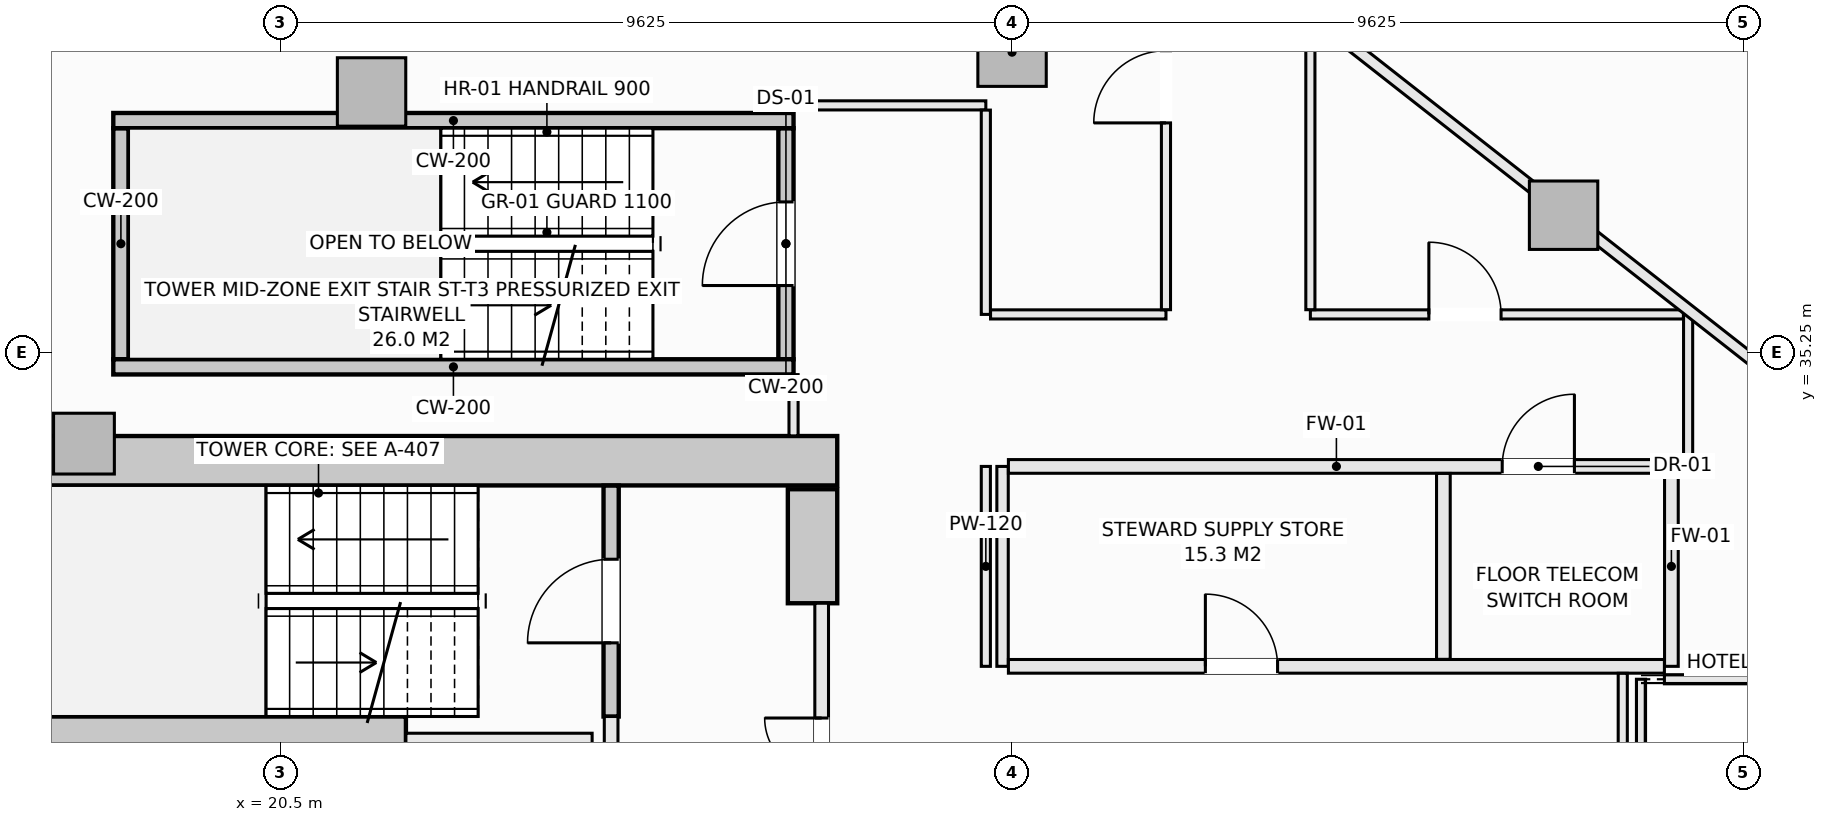
"""IFC4 building model, lengths in metres.
Left out: names, types, materials, properties, quantities, classifications, styles, units other than length and angle.
Written with IfcOpenShell. Run it as: python <this file> out.ifc"""

import sys

from ifc_helpers import new_model, si_unit, direction, frame, frame_2d, origin, origin_2d, place, context, subcontext, project, spatial, rectangle, extrude, element, fill, save


model = new_model("IFC4")
c1 = context("Model", 3, precision=1e-05, world=origin(), true_north=direction((0.0, 1.0)))
c2 = subcontext(c1, "Body", "Model", "MODEL_VIEW")
j1 = project(units=[si_unit("LENGTHUNIT", "METRE"), si_unit("PLANEANGLEUNIT", "RADIAN")], contexts=[c1])
p1 = place(None, origin())
s1 = spatial("IfcSite", under=j1, at=p1, CompositionType="ELEMENT")
p2 = place(p1, origin())
s2 = spatial("IfcBuilding", under=s1, at=p2, CompositionType="ELEMENT")
p3 = place(p2, frame((0.0, 0.0, 112.1)))
s3 = spatial("IfcBuildingStorey", under=s2, at=p3, CompositionType="ELEMENT", Elevation=112.1)
p4 = place(p3, frame((14.175, 33.825, -0.27), z_axis=(0.0, 0.0, 1.0), x_axis=(1.0, 0.0, 0.0)))
e1 = element("IfcWall", 1, at=p4, inside=s3, PredefinedType="SHEAR", context=c2, shape_type="SweptSolid", body=[
    extrude(rectangle(XDim=13.65, YDim=0.65, at=frame_2d((6.825, 0.0))), origin(), (0.0, 0.0, 1.0), 3.4),
])
p5 = place(p3, frame((27.5, 31.95, -0.27), z_axis=(0.0, 0.0, 1.0), x_axis=(0.0, 1.0, 0.0)))
e2 = element("IfcWall", 2, at=p5, inside=s3, PredefinedType="SHEAR", context=c2, shape_type="SweptSolid", body=[
    extrude(rectangle(XDim=1.5, YDim=0.65, at=frame_2d((0.75, 0.0))), origin(), (0.0, 0.0, 1.0), 3.4),
])
p6 = place(p3, frame((14.85, 30.25, -0.27), z_axis=(0.0, 0.0, 1.0), x_axis=(1.0, 0.0, 0.0)))
e3 = element("IfcWall", 3, at=p6, inside=s3, PredefinedType="SHEAR", context=c2, shape_type="SweptSolid", body=[
    extrude(rectangle(XDim=7.3, YDim=0.42, at=frame_2d((3.65, 0.0))), origin(), (0.0, 0.0, 1.0), 3.4),
])
for number, where, z_axis, x_axis in (
    (4, (37.382, 37.055, -0.27), (0.0, 0.0, 1.0), (1.0, 0.0, 0.0)),
    (5, (30.125, 39.2, -0.27), (0.0, 0.0, 1.0), (1.0, 0.0, 0.0)),
    (6, (21.698, 38.677, -0.27), (0.0, 0.0, 1.0), (1.0, 0.0, 0.0)),
):
    element("IfcColumn", number, at=place(p3, frame(where, z_axis=z_axis, x_axis=x_axis)), inside=s3, PredefinedType="COLUMN", context=c2, shape_type="SweptSolid", body=[
        extrude(rectangle(XDim=0.9, YDim=0.9, at=origin_2d()), origin(), (0.0, 0.0, 1.0), 3.4),
    ])
p7 = place(p3, frame((17.914, 34.05, -0.27), z_axis=(0.0, 0.0, 1.0), x_axis=(1.0, 0.0, 0.0)))
e7 = element("IfcColumn", 7, at=p7, inside=s3, PredefinedType="PILASTER", context=c2, shape_type="SweptSolid", body=[
    extrude(rectangle(XDim=0.8, YDim=0.8, at=origin_2d()), origin(), (0.0, 0.0, 1.0), 3.4),
])
p8 = place(p3, frame((14.481, 39.223, 0.0), z_axis=(0.0, 0.0, 1.0), x_axis=(0.616435134162, 0.787405693001, 0.0)))
e8 = element("IfcWall", 8, at=p8, inside=s3, PredefinedType="SOLIDWALL", context=c2, shape_type="SweptSolid", body=[
    extrude(rectangle(XDim=5.759, YDim=0.3, at=frame_2d((2.879, 0.0))), origin(), (0.0, 0.0, 1.0), 2.653),
])
p9 = place(p8, frame((1.829, 0.0, 0.74)))
e9 = element("IfcOpeningElement", 9, at=p9, cuts=e8, PredefinedType="OPENING", context=c2, shape_type="SweptSolid", body=[
    extrude(rectangle(XDim=2.1, YDim=1.7, at=frame_2d((1.05, 0.85))), frame((0.0, 0.16, 0.0), z_axis=(0.0, -1.0, 0.0), x_axis=(1.0, 0.0, 0.0)), (0.0, 0.0, 1.0), 0.32),
])
p10 = place(p3, frame((24.85, 30.46, -0.27), z_axis=(0.0, 0.0, 1.0), x_axis=(0.0, 1.0, 0.0)))
e10 = element("IfcWall", 10, at=p10, inside=s3, PredefinedType="SHEAR", context=c2, shape_type="SweptSolid", body=[
    extrude(rectangle(XDim=3.038, YDim=0.2, at=frame_2d((1.519, 0.0))), origin(), (0.0, 0.0, 1.0), 3.4),
])
p11 = place(p10, frame((0.969, 0.0, 0.27)))
e11 = element("IfcOpeningElement", 11, at=p11, cuts=e10, PredefinedType="OPENING", context=c2, shape_type="SweptSolid", body=[
    extrude(rectangle(XDim=1.1, YDim=2.15, at=frame_2d((0.55, 1.075))), frame((0.0, 0.11, 0.0), z_axis=(0.0, -1.0, 0.0), x_axis=(1.0, 0.0, 0.0)), (0.0, 0.0, 1.0), 0.22),
])
p12 = place(p3, frame((27.15, 35.16, -0.27), z_axis=(0.0, 0.0, 1.0), x_axis=(0.0, 1.0, 0.0)))
e12 = element("IfcWall", 12, at=p12, inside=s3, PredefinedType="SHEAR", context=c2, shape_type="SweptSolid", body=[
    extrude(rectangle(XDim=3.04, YDim=0.2, at=frame_2d((1.52, 0.0))), origin(), (0.0, 0.0, 1.0), 3.4),
])
p13 = place(p12, frame((0.97, 0.0, 0.27)))
e13 = element("IfcOpeningElement", 13, at=p13, cuts=e12, PredefinedType="OPENING", context=c2, shape_type="SweptSolid", body=[
    extrude(rectangle(XDim=1.1, YDim=2.15, at=frame_2d((0.55, 1.075))), frame((0.0, 0.11, 0.0), z_axis=(0.0, -1.0, 0.0), x_axis=(1.0, 0.0, 0.0)), (0.0, 0.0, 1.0), 0.22),
])
p14 = place(p3, frame((18.4, 35.16, -0.27), z_axis=(0.0, 0.0, 1.0), x_axis=(0.0, 1.0, 0.0)))
e14 = element("IfcWall", 14, at=p14, inside=s3, PredefinedType="SHEAR", context=c2, shape_type="SweptSolid", body=[
    extrude(rectangle(XDim=3.04, YDim=0.2, at=frame_2d((1.52, 0.0))), origin(), (0.0, 0.0, 1.0), 3.4),
])
for number, where, z_axis, x_axis in (
    (15, (18.3, 38.3, -0.27), (0.0, 0.0, 1.0), (1.0, 0.0, 0.0)),
    (16, (18.3, 35.06, -0.27), (0.0, 0.0, 1.0), (1.0, 0.0, 0.0)),
):
    element("IfcWall", number, at=place(p3, frame(where, z_axis=z_axis, x_axis=x_axis)), inside=s3, PredefinedType="SHEAR", context=c2, shape_type="SweptSolid", body=[
        extrude(rectangle(XDim=8.95, YDim=0.2, at=frame_2d((4.475, 0.0))), origin(), (0.0, 0.0, 1.0), 3.4),
    ])
p15 = place(p3, frame((22.15, 30.14, 0.0), z_axis=(0.0, 0.0, 1.0), x_axis=(1.0, 0.0, 0.0)))
e17 = element("IfcWall", 17, at=p15, inside=s3, PredefinedType="SOLIDWALL", context=c2, shape_type="SweptSolid", body=[
    extrude(rectangle(XDim=2.45, YDim=0.2, at=frame_2d((1.225, 0.0))), origin(), (0.0, 0.0, 1.0), 3.13),
])
p16 = place(p3, frame((24.85, 30.04, 0.0), z_axis=(0.0, 0.0, 1.0), x_axis=(0.0, 1.0, 0.0)))
e18 = element("IfcWall", 18, at=p16, inside=s3, PredefinedType="SOLIDWALL", context=c2, shape_type="SweptSolid", body=[
    extrude(rectangle(XDim=0.42, YDim=0.18, at=frame_2d((0.21, 0.0))), origin(), (0.0, 0.0, 1.0), 3.13),
])
p17 = place(p3, frame((27.62, 22.05, 0.0), z_axis=(0.0, 0.0, 1.0), x_axis=(0.0, 1.0, 0.0)))
e19 = element("IfcWall", 19, at=p17, inside=s3, PredefinedType="SOLIDWALL", context=c2, shape_type="SweptSolid", body=[
    extrude(rectangle(XDim=9.9, YDim=0.18, at=frame_2d((4.95, 0.0))), origin(), (0.0, 0.0, 1.0), 3.13),
])
p18 = place(p17, frame((4.475, 0.0, 0.0)))
e20 = element("IfcOpeningElement", 20, at=p18, cuts=e19, PredefinedType="OPENING", context=c2, shape_type="SweptSolid", body=[
    extrude(rectangle(XDim=0.95, YDim=2.1, at=frame_2d((0.475, 1.05))), frame((0.0, 0.1, 0.0), z_axis=(0.0, -1.0, 0.0), x_axis=(1.0, 0.0, 0.0)), (0.0, 0.0, 1.0), 0.2),
])
p19 = place(p17, frame((6.89, 0.0, 0.0)))
e21 = element("IfcOpeningElement", 21, at=p19, cuts=e19, PredefinedType="OPENING", context=c2, shape_type="SweptSolid", body=[
    extrude(rectangle(XDim=1.5, YDim=2.2, at=frame_2d((0.75, 1.1))), frame((0.0, 0.1, 0.0), z_axis=(0.0, -1.0, 0.0), x_axis=(1.0, 0.0, 0.0)), (0.0, 0.0, 1.0), 0.2),
])
p20 = place(p17, frame((1.51, 0.0, 0.0)))
e22 = element("IfcOpeningElement", 22, at=p20, cuts=e19, PredefinedType="OPENING", context=c2, shape_type="SweptSolid", body=[
    extrude(rectangle(XDim=1.5, YDim=2.2, at=frame_2d((0.75, 1.1))), frame((0.0, 0.1, 0.0), z_axis=(0.0, -1.0, 0.0), x_axis=(1.0, 0.0, 0.0)), (0.0, 0.0, 1.0), 0.2),
])
p21 = place(p3, frame((30.0, 31.12, 0.0), z_axis=(0.0, 0.0, 1.0), x_axis=(0.0, 1.0, 0.0)))
e23 = element("IfcWall", 23, at=p21, inside=s3, PredefinedType="PARTITIONING", context=c2, shape_type="SweptSolid", body=[
    extrude(rectangle(XDim=2.63, YDim=0.15, at=frame_2d((1.315, 0.0))), origin(), (0.0, 0.0, 1.0), 3.13),
])
p22 = place(p3, frame((38.8, 31.12, 0.0), z_axis=(0.0, 0.0, 1.0), x_axis=(0.0, 1.0, 0.0)))
e24 = element("IfcWall", 24, at=p22, inside=s3, PredefinedType="SOLIDWALL", context=c2, shape_type="SweptSolid", body=[
    extrude(rectangle(XDim=2.63, YDim=0.18, at=frame_2d((1.315, 0.0))), origin(), (0.0, 0.0, 1.0), 3.13),
])
p23 = place(p3, frame((30.077, 31.12, 0.0), z_axis=(0.0, 0.0, 1.0), x_axis=(1.0, 0.0, 0.0)))
e25 = element("IfcWall", 25, at=p23, inside=s3, PredefinedType="SOLIDWALL", context=c2, shape_type="SweptSolid", body=[
    extrude(rectangle(XDim=8.631, YDim=0.18, at=frame_2d((4.315, 0.0))), origin(), (0.0, 0.0, 1.0), 3.13),
])
p24 = place(p23, frame((2.592, 0.0, 0.0)))
e26 = element("IfcOpeningElement", 26, at=p24, cuts=e25, PredefinedType="OPENING", context=c2, shape_type="SweptSolid", body=[
    extrude(rectangle(XDim=0.95, YDim=2.1, at=frame_2d((0.475, 1.05))), frame((0.0, 0.1, 0.0), z_axis=(0.0, -1.0, 0.0), x_axis=(1.0, 0.0, 0.0)), (0.0, 0.0, 1.0), 0.2),
])
p25 = place(p3, frame((30.077, 33.75, 0.0), z_axis=(0.0, 0.0, 1.0), x_axis=(1.0, 0.0, 0.0)))
e27 = element("IfcWall", 27, at=p25, inside=s3, PredefinedType="SOLIDWALL", context=c2, shape_type="SweptSolid", body=[
    extrude(rectangle(XDim=8.631, YDim=0.18, at=frame_2d((4.315, 0.0))), origin(), (0.0, 0.0, 1.0), 3.13),
])
p26 = place(p25, frame((6.497, 0.0, 0.0)))
e28 = element("IfcOpeningElement", 28, at=p26, cuts=e27, PredefinedType="OPENING", context=c2, shape_type="SweptSolid", body=[
    extrude(rectangle(XDim=0.95, YDim=2.1, at=frame_2d((0.475, 1.05))), frame((0.0, 0.1, 0.0), z_axis=(0.0, -1.0, 0.0), x_axis=(1.0, 0.0, 0.0)), (0.0, 0.0, 1.0), 0.2),
])
p27 = place(p3, frame((35.8, 31.212, 0.0), z_axis=(0.0, 0.0, 1.0), x_axis=(0.0, 1.0, 0.0)))
e29 = element("IfcWall", 29, at=p27, inside=s3, PredefinedType="SOLIDWALL", context=c2, shape_type="SweptSolid", body=[
    extrude(rectangle(XDim=2.446, YDim=0.18, at=frame_2d((1.223, 0.0))), origin(), (0.0, 0.0, 1.0), 3.13),
])
p28 = place(p3, frame((39.02, 33.75, 0.0), z_axis=(0.0, 0.0, 1.0), x_axis=(0.0, 1.0, 0.0)))
e30 = element("IfcWall", 30, at=p28, inside=s3, PredefinedType="PARTITIONING", context=c2, shape_type="SweptSolid", body=[
    extrude(rectangle(XDim=2.0, YDim=0.12, at=frame_2d((1.0, 0.0))), origin(), (0.0, 0.0, 1.0), 3.13),
])
p29 = place(p3, frame((27.25, 34.152, 0.0), z_axis=(0.0, 0.0, 1.0), x_axis=(0.0, 1.0, 0.0)))
e31 = element("IfcWall", 31, at=p29, inside=s3, PredefinedType="PARTITIONING", context=c2, shape_type="SweptSolid", body=[
    extrude(rectangle(XDim=0.806, YDim=0.12, at=frame_2d((0.403, 0.0))), origin(), (0.0, 0.0, 1.0), 3.13),
])
p30 = place(p3, frame((27.25, 38.5, 0.0), z_axis=(0.0, 0.0, 1.0), x_axis=(1.0, 0.0, 0.0)))
e32 = element("IfcWall", 32, at=p30, inside=s3, PredefinedType="PARTITIONING", context=c2, shape_type="SweptSolid", body=[
    extrude(rectangle(XDim=2.53, YDim=0.12, at=frame_2d((1.265, 0.0))), origin(), (0.0, 0.0, 1.0), 3.13),
])
p31 = place(p3, frame((29.78, 31.12, 0.0), z_axis=(0.0, 0.0, 1.0), x_axis=(0.0, 1.0, 0.0)))
e33 = element("IfcWall", 33, at=p31, inside=s3, PredefinedType="PARTITIONING", context=c2, shape_type="SweptSolid", body=[
    extrude(rectangle(XDim=2.63, YDim=0.12, at=frame_2d((1.315, 0.0))), origin(), (0.0, 0.0, 1.0), 3.13),
])
p32 = place(p3, frame((29.78, 35.75, 0.0), z_axis=(0.0, 0.0, 1.0), x_axis=(0.0, 1.0, 0.0)))
e34 = element("IfcWall", 34, at=p32, inside=s3, PredefinedType="PARTITIONING", context=c2, shape_type="SweptSolid", body=[
    extrude(rectangle(XDim=2.688, YDim=0.12, at=frame_2d((1.344, 0.0))), origin(), (0.0, 0.0, 1.0), 3.13),
])
p33 = place(p3, frame((29.842, 35.75, 0.0), z_axis=(0.0, 0.0, 1.0), x_axis=(1.0, 0.0, 0.0)))
e35 = element("IfcWall", 35, at=p33, inside=s3, PredefinedType="PARTITIONING", context=c2, shape_type="SweptSolid", body=[
    extrude(rectangle(XDim=2.308, YDim=0.12, at=frame_2d((1.154, 0.0))), origin(), (0.0, 0.0, 1.0), 3.13),
])
p34 = place(p3, frame((34.05, 35.75, 0.0), z_axis=(0.0, 0.0, 1.0), x_axis=(1.0, 0.0, 0.0)))
e36 = element("IfcWall", 36, at=p34, inside=s3, PredefinedType="PARTITIONING", context=c2, shape_type="SweptSolid", body=[
    extrude(rectangle(XDim=4.908, YDim=0.12, at=frame_2d((2.454, 0.0))), origin(), (0.0, 0.0, 1.0), 2.505),
])
p35 = place(p34, frame((1.559, 0.0, 0.0)))
e37 = element("IfcOpeningElement", 37, at=p35, cuts=e36, PredefinedType="OPENING", context=c2, shape_type="SweptSolid", body=[
    extrude(rectangle(XDim=0.95, YDim=2.1, at=frame_2d((0.475, 1.05))), frame((0.0, 0.07, 0.0), z_axis=(0.0, -1.0, 0.0), x_axis=(1.0, 0.0, 0.0)), (0.0, 0.0, 1.0), 0.14),
])
p36 = place(p3, frame((32.15, 35.812, 0.0), z_axis=(0.0, 0.0, 1.0), x_axis=(0.0, 1.0, 0.0)))
e38 = element("IfcWall", 38, at=p36, inside=s3, PredefinedType="PARTITIONING", context=c2, shape_type="SweptSolid", body=[
    extrude(rectangle(XDim=6.388, YDim=0.12, at=frame_2d((3.194, 0.0))), origin(), (0.0, 0.0, 1.0), 3.13),
])
p37 = place(p36, frame((2.458, 0.0, 0.0)))
e39 = element("IfcOpeningElement", 39, at=p37, cuts=e38, PredefinedType="OPENING", context=c2, shape_type="SweptSolid", body=[
    extrude(rectangle(XDim=0.95, YDim=2.1, at=frame_2d((0.475, 1.05))), frame((0.0, 0.07, 0.0), z_axis=(0.0, -1.0, 0.0), x_axis=(1.0, 0.0, 0.0)), (0.0, 0.0, 1.0), 0.14),
])
p38 = place(p3, frame((34.05, 35.812, 0.0), z_axis=(0.0, 0.0, 1.0), x_axis=(0.0, 1.0, 0.0)))
e40 = element("IfcWall", 40, at=p38, inside=s3, PredefinedType="PARTITIONING", context=c2, shape_type="SweptSolid", body=[
    extrude(rectangle(XDim=6.326, YDim=0.12, at=frame_2d((3.163, 0.0))), origin(), (0.0, 0.0, 1.0), 2.812),
])
p39 = place(p38, frame((4.4, 0.0, 0.0)))
e41 = element("IfcOpeningElement", 41, at=p39, cuts=e40, PredefinedType="OPENING", context=c2, shape_type="SweptSolid", body=[
    extrude(rectangle(XDim=0.95, YDim=2.1, at=frame_2d((0.475, 1.05))), frame((0.0, 0.07, 0.0), z_axis=(0.0, -1.0, 0.0), x_axis=(1.0, 0.0, 0.0)), (0.0, 0.0, 1.0), 0.14),
])
p40 = place(p3, frame((38.16, 28.997, 0.0), z_axis=(0.0, 0.0, 1.0), x_axis=(0.0, 1.0, 0.0)))
e42 = element("IfcWall", 42, at=p40, inside=s3, PredefinedType="PARTITIONING", context=c2, shape_type="SweptSolid", body=[
    extrude(rectangle(XDim=2.031, YDim=0.12, at=frame_2d((1.016, 0.0))), origin(), (0.0, 0.0, 1.0), 3.13),
])
p41 = place(p3, frame((34.112, 39.661, 0.0), z_axis=(0.0, 0.0, 1.0), x_axis=(0.786863471843, -0.617127115495, 0.0)))
e43 = element("IfcWall", 43, at=p41, inside=s3, PredefinedType="PARTITIONING", context=c2, shape_type="SweptSolid", body=[
    extrude(rectangle(XDim=14.103, YDim=0.15, at=frame_2d((7.052, 0.0))), origin(), (0.0, 0.0, 1.0), 2.505),
])
p42 = place(p3, frame((38.708, 30.95, 0.0), z_axis=(0.0, 0.0, 1.0), x_axis=(1.0, 0.0, 0.0)))
e44 = element("IfcWall", 44, at=p42, inside=s3, PredefinedType="PARTITIONING", context=c2, shape_type="SweptSolid", body=[
    extrude(rectangle(XDim=5.03, YDim=0.12, at=frame_2d((2.515, 0.0))), origin(), (0.0, 0.0, 1.0), 3.13),
])
p43 = place(p3, frame((38.4, 30.041, 0.0), z_axis=(0.0, 0.0, 1.0), x_axis=(0.0, 1.0, 0.0)))
e45 = element("IfcWall", 45, at=p43, inside=s3, PredefinedType="PARTITIONING", context=c2, shape_type="SweptSolid", body=[
    extrude(rectangle(XDim=0.909, YDim=0.12, at=frame_2d((0.455, 0.0))), origin(), (0.0, 0.0, 1.0), 3.13),
])
p44 = place(p11, origin())
e46 = element("IfcDoor", 46, at=p44, inside=s3, OperationType="SINGLE_SWING_LEFT", PredefinedType="DOOR", context=c2, shape_type="SweptSolid", body=[
    extrude(rectangle(XDim=1.1, YDim=2.15, at=frame_2d((0.55, 1.075))), frame((0.0, 0.025, 0.0), z_axis=(0.0, -1.0, 0.0), x_axis=(1.0, 0.0, 0.0)), (0.0, 0.0, 1.0), 0.05),
])
fill(e11, e46)
p45 = place(p13, origin())
e47 = element("IfcDoor", 47, at=p45, inside=s3, OperationType="SINGLE_SWING_LEFT", PredefinedType="DOOR", context=c2, shape_type="SweptSolid", body=[
    extrude(rectangle(XDim=1.1, YDim=2.15, at=frame_2d((0.55, 1.075))), frame((0.0, 0.025, 0.0), z_axis=(0.0, -1.0, 0.0), x_axis=(1.0, 0.0, 0.0)), (0.0, 0.0, 1.0), 0.05),
])
fill(e13, e47)
p46 = place(p19, origin())
e48 = element("IfcDoor", 48, at=p46, inside=s3, OperationType="DOUBLE_DOOR_SINGLE_SWING", PredefinedType="DOOR", context=c2, shape_type="SweptSolid", body=[
    extrude(rectangle(XDim=1.5, YDim=2.2, at=frame_2d((0.75, 1.1))), frame((0.0, 0.025, 0.0), z_axis=(0.0, -1.0, 0.0), x_axis=(1.0, 0.0, 0.0)), (0.0, 0.0, 1.0), 0.05),
])
fill(e21, e48)
p47 = place(p24, origin())
e49 = element("IfcDoor", 49, at=p47, inside=s3, OperationType="SINGLE_SWING_LEFT", PredefinedType="DOOR", context=c2, shape_type="SweptSolid", body=[
    extrude(rectangle(XDim=0.95, YDim=2.1, at=frame_2d((0.475, 1.05))), frame((0.0, 0.025, 0.0), z_axis=(0.0, -1.0, 0.0), x_axis=(1.0, 0.0, 0.0)), (0.0, 0.0, 1.0), 0.05),
])
fill(e26, e49)
p48 = place(p26, origin())
e50 = element("IfcDoor", 50, at=p48, inside=s3, OperationType="SINGLE_SWING_RIGHT", PredefinedType="DOOR", context=c2, shape_type="SweptSolid", body=[
    extrude(rectangle(XDim=0.95, YDim=2.1, at=frame_2d((0.475, 1.05))), frame((0.0, 0.025, 0.0), z_axis=(0.0, -1.0, 0.0), x_axis=(1.0, 0.0, 0.0)), (0.0, 0.0, 1.0), 0.05),
])
fill(e28, e50)
p49 = place(p35, origin())
e51 = element("IfcDoor", 51, at=p49, inside=s3, OperationType="SINGLE_SWING_LEFT", PredefinedType="DOOR", context=c2, shape_type="SweptSolid", body=[
    extrude(rectangle(XDim=0.95, YDim=2.1, at=frame_2d((0.475, 1.05))), frame((0.0, 0.025, 0.0), z_axis=(0.0, -1.0, 0.0), x_axis=(1.0, 0.0, 0.0)), (0.0, 0.0, 1.0), 0.05),
])
fill(e37, e51)
p50 = place(p37, origin())
e52 = element("IfcDoor", 52, at=p50, inside=s3, OperationType="SINGLE_SWING_LEFT", PredefinedType="DOOR", context=c2, shape_type="SweptSolid", body=[
    extrude(rectangle(XDim=0.95, YDim=2.1, at=frame_2d((0.475, 1.05))), frame((0.0, 0.025, 0.0), z_axis=(0.0, -1.0, 0.0), x_axis=(1.0, 0.0, 0.0)), (0.0, 0.0, 1.0), 0.05),
])
fill(e39, e52)
save(model, sys.argv[1])
